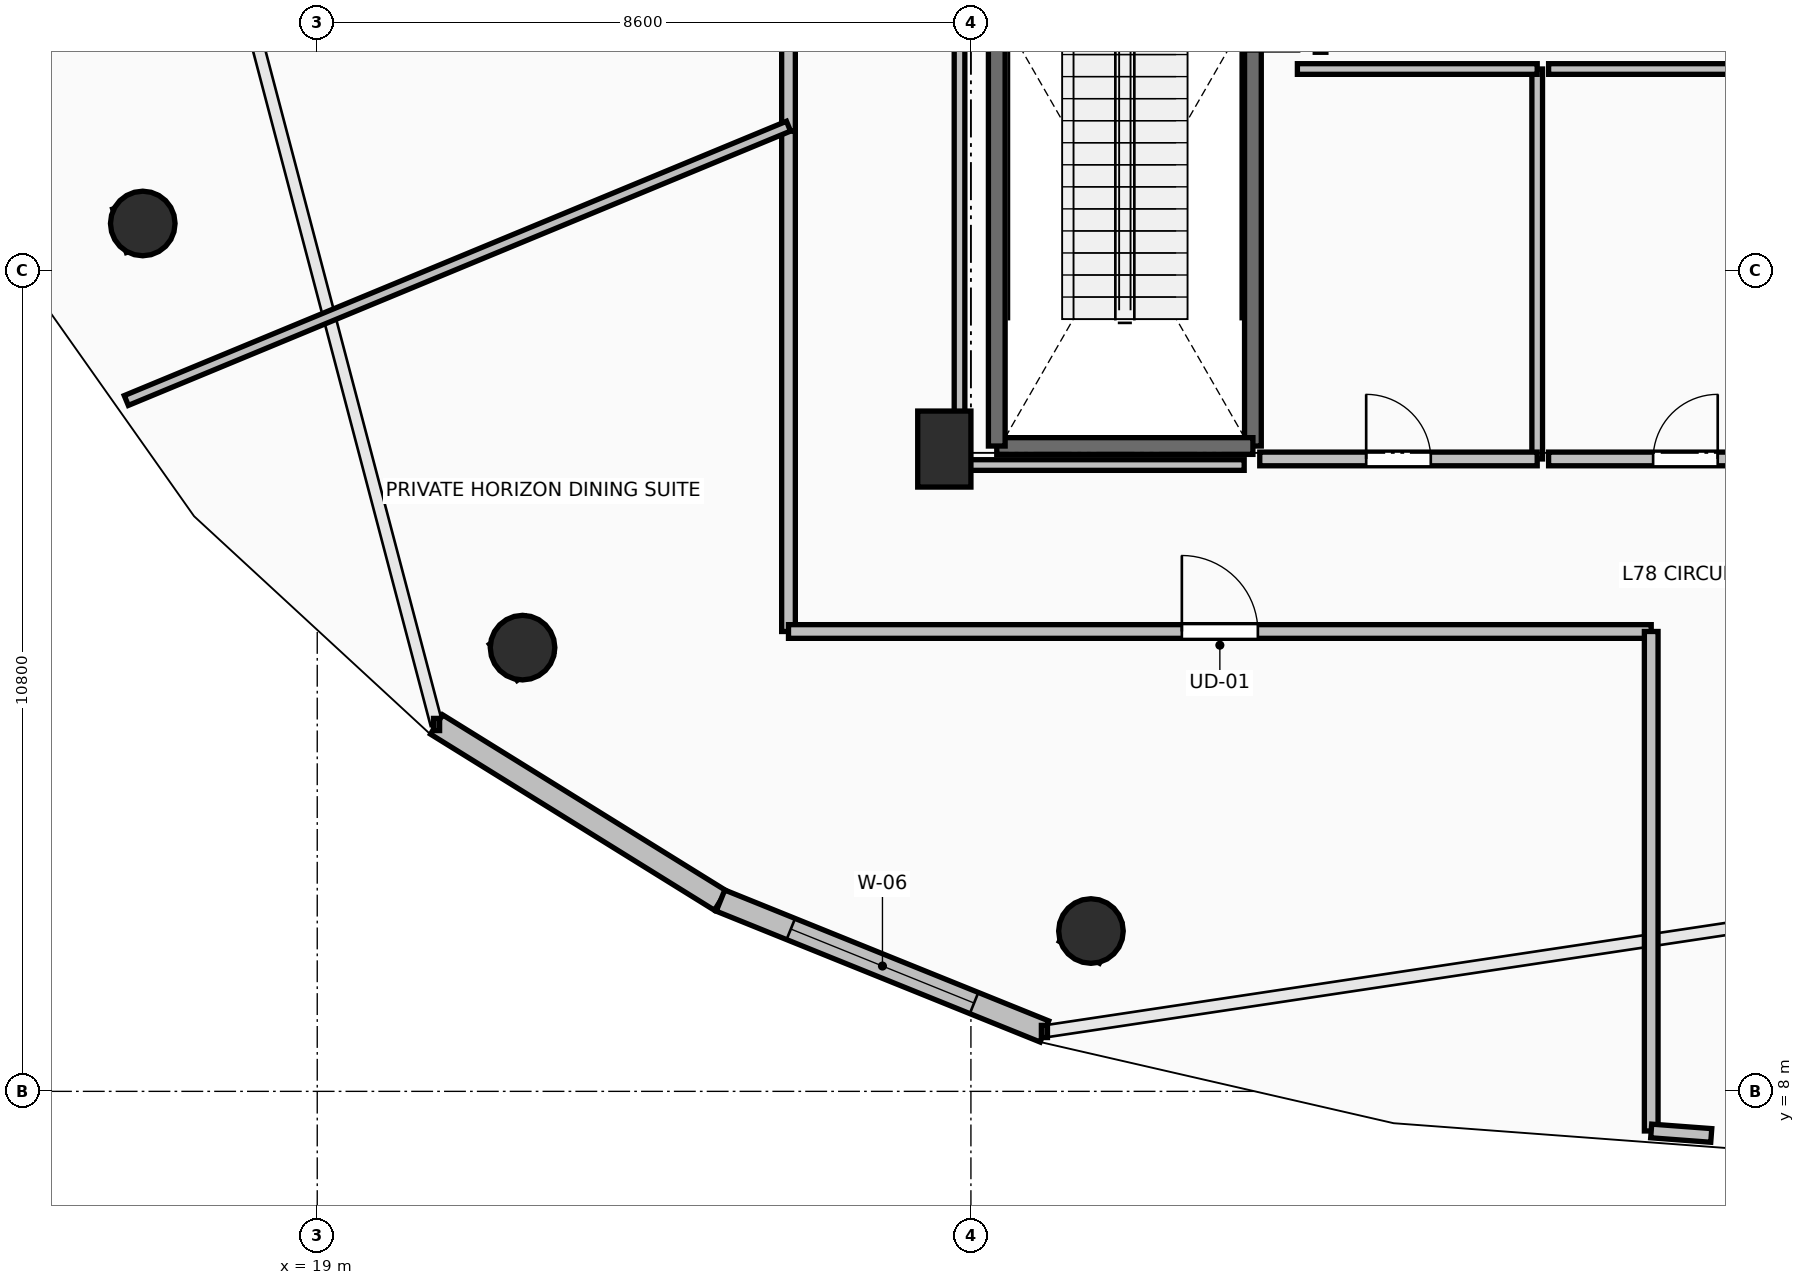
"""IFC4 building model, lengths in metres.
Left out: names, types, materials, properties, quantities, classifications, styles, units other than length and angle.
Written with IfcOpenShell. Run it as: python <this file> out.ifc"""

import sys

from ifc_helpers import new_model, si_unit, direction, frame, frame_2d, origin, origin_2d, place, context, subcontext, project, spatial, rectangle, circle, extrude, element, fill, save


model = new_model("IFC4")
c1 = context("Model", 3, precision=1e-05, world=origin(), true_north=direction((0.0, 1.0)))
c2 = subcontext(c1, "Body", "Model", "MODEL_VIEW")
j1 = project(units=[si_unit("LENGTHUNIT", "METRE"), si_unit("PLANEANGLEUNIT", "RADIAN")], contexts=[c1])
p1 = place(None, origin())
s1 = spatial("IfcSite", under=j1, at=p1, CompositionType="ELEMENT")
p2 = place(p1, origin())
s2 = spatial("IfcBuilding", under=s1, at=p2, CompositionType="ELEMENT")
p3 = place(p2, frame((0.0, 0.0, 290.4)))
s3 = spatial("IfcBuildingStorey", under=s2, at=p3, CompositionType="ELEMENT", Elevation=290.4)
for number, where, z_axis, x_axis in (
    (1, (16.705, 19.418, 0.0), (0.0, 0.0, 1.0), (-0.924, -0.383, 0.0)),
    (2, (21.701, 13.838, 0.0), (0.0, 0.0, 1.0), (-0.707, -0.707, 0.0)),
    (3, (29.179, 10.109, 0.0), (0.0, 0.0, 1.0), (-0.383, -0.924, 0.0)),
):
    element("IfcColumn", number, at=place(p3, frame(where, z_axis=z_axis, x_axis=x_axis)), inside=s3, PredefinedType="COLUMN", context=c2, shape_type="SweptSolid", body=[
        extrude(circle(Radius=0.425, at=origin_2d()), origin(), (0.0, 0.0, 1.0), 5.0),
    ])
p4 = place(p3, frame((27.25, 16.45, 0.0), z_axis=(0.0, 0.0, 1.0), x_axis=(1.0, 0.0, 0.0)))
e4 = element("IfcColumn", 4, at=p4, inside=s3, PredefinedType="PILASTER", context=c2, shape_type="SweptSolid", body=[
    extrude(rectangle(XDim=0.7, YDim=1.0, at=origin_2d()), origin(), (0.0, 0.0, 1.0), 5.0),
])
p5 = place(p3, frame((20.57, 12.827, 0.0), z_axis=(0.0, 0.0, 1.0), x_axis=(0.849803177952, -0.527100141096, 0.0)))
e5 = element("IfcWall", 5, at=p5, inside=s3, PredefinedType="STANDARD", context=c2, shape_type="SweptSolid", body=[
    extrude(rectangle(XDim=4.396, YDim=0.3, at=frame_2d((2.198, 0.0))), origin(), (0.0, 0.0, 1.0), 4.72),
])
p6 = place(p3, frame((24.305, 10.51, 0.0), z_axis=(0.0, 0.0, 1.0), x_axis=(0.927196432407, -0.374575460663, 0.0)))
e6 = element("IfcWall", 6, at=p6, inside=s3, PredefinedType="STANDARD", context=c2, shape_type="SweptSolid", body=[
    extrude(rectangle(XDim=4.596, YDim=0.3, at=frame_2d((2.298, 0.0))), origin(), (0.0, 0.0, 1.0), 4.72),
])
p7 = place(p6, frame((0.998, 0.0, 0.85)))
e7 = element("IfcOpeningElement", 7, at=p7, cuts=e6, PredefinedType="OPENING", context=c2, shape_type="SweptSolid", body=[
    extrude(rectangle(XDim=2.6, YDim=2.5, at=frame_2d((1.3, 1.25))), frame((0.0, 0.165, 0.0), z_axis=(0.0, -1.0, 0.0), x_axis=(1.0, 0.0, 0.0)), (0.0, 0.0, 1.0), 0.33),
])
p8 = place(p3, frame((31.31, 23.91, 0.0), z_axis=(0.0, 0.0, 1.0), x_axis=(0.0, -1.0, 0.0)))
e8 = element("IfcWall", 8, at=p8, inside=s3, PredefinedType="SOLIDWALL", context=c2, shape_type="SweptSolid", body=[
    extrude(rectangle(XDim=7.42, YDim=0.22, at=frame_2d((3.71, 0.0))), origin(), (0.0, 0.0, 1.0), 4.72),
])
p9 = place(p3, frame((31.31, 16.49, 0.0), z_axis=(0.0, 0.0, 1.0), x_axis=(-1.0, 0.0, 0.0)))
e9 = element("IfcWall", 9, at=p9, inside=s3, PredefinedType="SOLIDWALL", context=c2, shape_type="SweptSolid", body=[
    extrude(rectangle(XDim=3.37, YDim=0.22, at=frame_2d((1.685, 0.0))), origin(), (0.0, 0.0, 1.0), 4.72),
])
p10 = place(p3, frame((27.94, 16.49, 0.0), z_axis=(0.0, 0.0, 1.0), x_axis=(0.0, 1.0, 0.0)))
e10 = element("IfcWall", 10, at=p10, inside=s3, PredefinedType="SOLIDWALL", context=c2, shape_type="SweptSolid", body=[
    extrude(rectangle(XDim=7.42, YDim=0.22, at=frame_2d((3.71, 0.0))), origin(), (0.0, 0.0, 1.0), 4.72),
])
p11 = place(p3, frame((35.05, 16.32, 0.0), z_axis=(0.0, 0.0, 1.0), x_axis=(0.0, 1.0, 0.0)))
e11 = element("IfcWall", 11, at=p11, inside=s3, PredefinedType="PARTITIONING", context=c2, shape_type="SweptSolid", body=[
    extrude(rectangle(XDim=5.13, YDim=0.14, at=frame_2d((2.565, 0.0))), origin(), (0.0, 0.0, 1.0), 4.72),
])
p12 = place(p3, frame((35.05, 21.45, 0.0), z_axis=(0.0, 0.0, 1.0), x_axis=(-1.0, 0.0, 0.0)))
e12 = element("IfcWall", 12, at=p12, inside=s3, PredefinedType="PARTITIONING", context=c2, shape_type="SweptSolid", body=[
    extrude(rectangle(XDim=3.155, YDim=0.14, at=frame_2d((1.578, 0.0))), origin(), (0.0, 0.0, 1.0), 4.72),
])
p13 = place(p3, frame((31.4, 16.32, 0.0), z_axis=(0.0, 0.0, 1.0), x_axis=(1.0, 0.0, 0.0)))
e13 = element("IfcWall", 13, at=p13, inside=s3, PredefinedType="PARTITIONING", context=c2, shape_type="SweptSolid", body=[
    extrude(rectangle(XDim=3.65, YDim=0.18, at=frame_2d((1.825, 0.0))), origin(), (0.0, 0.0, 1.0), 4.72),
])
p14 = place(p13, frame((1.4, 0.0, 0.0)))
e14 = element("IfcOpeningElement", 14, at=p14, cuts=e13, PredefinedType="OPENING", context=c2, shape_type="SweptSolid", body=[
    extrude(rectangle(XDim=0.85, YDim=2.1, at=frame_2d((0.425, 1.05))), frame((0.0, 0.105, 0.0), z_axis=(0.0, -1.0, 0.0), x_axis=(1.0, 0.0, 0.0)), (0.0, 0.0, 1.0), 0.21),
])
p15 = place(p3, frame((38.8, 21.45, 0.0), z_axis=(0.0, 0.0, 1.0), x_axis=(-1.0, 0.0, 0.0)))
e15 = element("IfcWall", 15, at=p15, inside=s3, PredefinedType="PARTITIONING", context=c2, shape_type="SweptSolid", body=[
    extrude(rectangle(XDim=3.6, YDim=0.14, at=frame_2d((1.8, 0.0))), origin(), (0.0, 0.0, 1.0), 4.72),
])
p16 = place(p3, frame((35.2, 16.32, 0.0), z_axis=(0.0, 0.0, 1.0), x_axis=(1.0, 0.0, 0.0)))
e16 = element("IfcWall", 16, at=p16, inside=s3, PredefinedType="PARTITIONING", context=c2, shape_type="SweptSolid", body=[
    extrude(rectangle(XDim=3.6, YDim=0.18, at=frame_2d((1.8, 0.0))), origin(), (0.0, 0.0, 1.0), 4.72),
])
p17 = place(p16, frame((1.375, 0.0, 0.0)))
e17 = element("IfcOpeningElement", 17, at=p17, cuts=e16, PredefinedType="OPENING", context=c2, shape_type="SweptSolid", body=[
    extrude(rectangle(XDim=0.85, YDim=2.1, at=frame_2d((0.425, 1.05))), frame((0.0, 0.105, 0.0), z_axis=(0.0, -1.0, 0.0), x_axis=(1.0, 0.0, 0.0)), (0.0, 0.0, 1.0), 0.21),
])
p18 = place(p3, frame((25.2, 35.95, 0.0), z_axis=(0.0, 0.0, 1.0), x_axis=(0.0, -1.0, 0.0)))
e18 = element("IfcWall", 18, at=p18, inside=s3, PredefinedType="PARTITIONING", context=c2, shape_type="SweptSolid", body=[
    extrude(rectangle(XDim=15.317, YDim=0.18, at=frame_2d((7.658, 0.0))), origin(), (0.0, 0.0, 1.0), 3.912),
])
p19 = place(p18, frame((7.158, 0.0, 0.0)))
e19 = element("IfcOpeningElement", 19, at=p19, cuts=e18, PredefinedType="OPENING", context=c2, shape_type="SweptSolid", body=[
    extrude(rectangle(XDim=1.0, YDim=2.15, at=frame_2d((0.5, 1.075))), frame((0.0, 0.105, 0.0), z_axis=(0.0, -1.0, 0.0), x_axis=(1.0, 0.0, 0.0)), (0.0, 0.0, 1.0), 0.21),
])
p20 = place(p3, frame((25.2, 20.633, 0.0), z_axis=(0.0, 0.0, 1.0), x_axis=(0.0, -1.0, 0.0)))
e20 = element("IfcWall", 20, at=p20, inside=s3, PredefinedType="PARTITIONING", context=c2, shape_type="SweptSolid", body=[
    extrude(rectangle(XDim=6.583, YDim=0.18, at=frame_2d((3.292, 0.0))), origin(), (0.0, 0.0, 1.0), 3.912),
])
p21 = place(p3, frame((25.2, 14.05, 0.0), z_axis=(0.0, 0.0, 1.0), x_axis=(1.0, 0.0, 0.0)))
e21 = element("IfcWall", 21, at=p21, inside=s3, PredefinedType="PARTITIONING", context=c2, shape_type="SweptSolid", body=[
    extrude(rectangle(XDim=11.35, YDim=0.18, at=frame_2d((5.675, 0.0))), origin(), (0.0, 0.0, 1.0), 3.912),
])
p22 = place(p21, frame((5.175, 0.0, 0.0)))
e22 = element("IfcOpeningElement", 22, at=p22, cuts=e21, PredefinedType="OPENING", context=c2, shape_type="SweptSolid", body=[
    extrude(rectangle(XDim=1.0, YDim=2.15, at=frame_2d((0.5, 1.075))), frame((0.0, 0.105, 0.0), z_axis=(0.0, -1.0, 0.0), x_axis=(1.0, 0.0, 0.0)), (0.0, 0.0, 1.0), 0.21),
])
p23 = place(p3, frame((36.55, 14.05, 0.0), z_axis=(0.0, 0.0, 1.0), x_axis=(0.0, -1.0, 0.0)))
e23 = element("IfcWall", 23, at=p23, inside=s3, PredefinedType="PARTITIONING", context=c2, shape_type="SweptSolid", body=[
    extrude(rectangle(XDim=6.571, YDim=0.18, at=frame_2d((3.286, 0.0))), origin(), (0.0, 0.0, 1.0), 4.304),
])
p24 = place(p3, frame((36.55, 7.479, 0.0), z_axis=(0.0, 0.0, 1.0), x_axis=(0.997215374878, -0.074575439036, 0.0)))
e24 = element("IfcWall", 24, at=p24, inside=s3, PredefinedType="PARTITIONING", context=c2, shape_type="SweptSolid", body=[
    extrude(rectangle(XDim=0.792, YDim=0.18, at=frame_2d((0.396, 0.0))), origin(), (0.0, 0.0, 1.0), 4.72),
])
p25 = place(p3, frame((16.488, 17.089, 0.0), z_axis=(0.0, 0.0, 1.0), x_axis=(0.923868518156, 0.382710022289, 0.0)))
e25 = element("IfcWall", 25, at=p25, inside=s3, PredefinedType="PARTITIONING", context=c2, shape_type="SweptSolid", body=[
    extrude(rectangle(XDim=9.43, YDim=0.14, at=frame_2d((4.715, 0.0))), origin(), (0.0, 0.0, 1.0), 3.912),
])
p26 = place(p3, frame((27.45, 23.754, 0.0), z_axis=(0.0, 0.0, 1.0), x_axis=(0.0, -1.0, 0.0)))
e26 = element("IfcWall", 26, at=p26, inside=s3, PredefinedType="PARTITIONING", context=c2, shape_type="SweptSolid", body=[
    extrude(rectangle(XDim=7.514, YDim=0.14, at=frame_2d((3.757, 0.0))), origin(), (0.0, 0.0, 1.0), 3.912),
])
p27 = place(p3, frame((27.45, 16.24, 0.0), z_axis=(0.0, 0.0, 1.0), x_axis=(1.0, 0.0, 0.0)))
e27 = element("IfcWall", 27, at=p27, inside=s3, PredefinedType="PARTITIONING", context=c2, shape_type="SweptSolid", body=[
    extrude(rectangle(XDim=3.745, YDim=0.14, at=frame_2d((1.873, 0.0))), origin(), (0.0, 0.0, 1.0), 3.912),
])
p28 = place(p7, origin())
e28 = element("IfcWindow", 28, at=p28, inside=s3, PartitioningType="SINGLE_PANEL", PredefinedType="WINDOW", context=c2, shape_type="SweptSolid", body=[
    extrude(rectangle(XDim=2.6, YDim=2.5, at=frame_2d((1.3, 1.25))), frame((0.0, 0.03, 0.0), z_axis=(0.0, -1.0, 0.0), x_axis=(1.0, 0.0, 0.0)), (0.0, 0.0, 1.0), 0.06),
])
fill(e7, e28)
p29 = place(p14, origin())
e29 = element("IfcDoor", 29, at=p29, inside=s3, OperationType="SINGLE_SWING_LEFT", PredefinedType="DOOR", context=c2, shape_type="SweptSolid", body=[
    extrude(rectangle(XDim=0.85, YDim=2.1, at=frame_2d((0.425, 1.05))), frame((0.0, 0.025, 0.0), z_axis=(0.0, -1.0, 0.0), x_axis=(1.0, 0.0, 0.0)), (0.0, 0.0, 1.0), 0.05),
])
fill(e14, e29)
p30 = place(p17, origin())
e30 = element("IfcDoor", 30, at=p30, inside=s3, OperationType="SINGLE_SWING_RIGHT", PredefinedType="DOOR", context=c2, shape_type="SweptSolid", body=[
    extrude(rectangle(XDim=0.85, YDim=2.1, at=frame_2d((0.425, 1.05))), frame((0.0, 0.025, 0.0), z_axis=(0.0, -1.0, 0.0), x_axis=(1.0, 0.0, 0.0)), (0.0, 0.0, 1.0), 0.05),
])
fill(e17, e30)
p31 = place(p22, origin())
e31 = element("IfcDoor", 31, at=p31, inside=s3, OperationType="SINGLE_SWING_LEFT", PredefinedType="DOOR", context=c2, shape_type="SweptSolid", body=[
    extrude(rectangle(XDim=1.0, YDim=2.15, at=frame_2d((0.5, 1.075))), frame((0.0, 0.025, 0.0), z_axis=(0.0, -1.0, 0.0), x_axis=(1.0, 0.0, 0.0)), (0.0, 0.0, 1.0), 0.05),
])
fill(e22, e31)
save(model, sys.argv[1])
